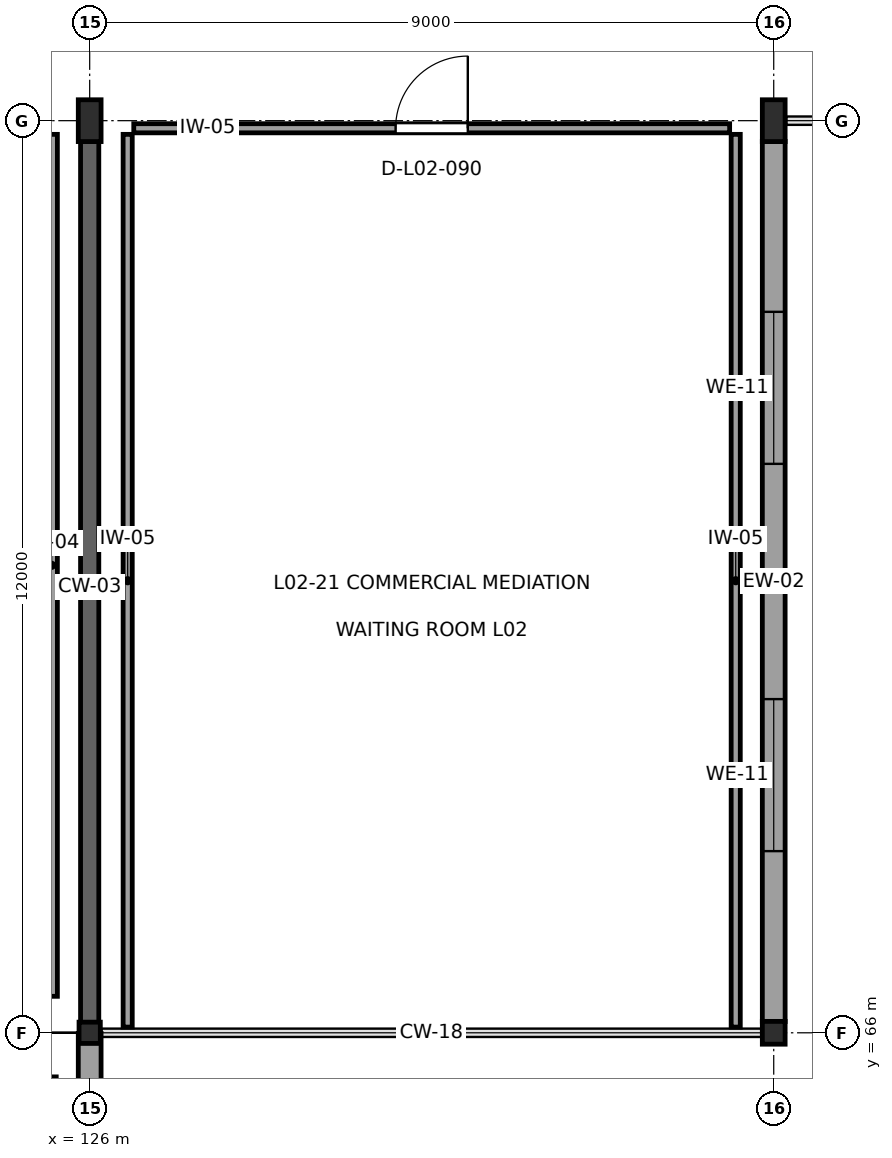
"""IFC4 building model, lengths in metres.
Left out: names, types, materials, properties, quantities, classifications, styles, units other than length and angle.
Written with IfcOpenShell. Run it as: python <this file> out.ifc"""

import sys

from ifc_helpers import new_model, si_unit, direction, frame, frame_2d, origin, origin_2d, place, context, subcontext, project, spatial, rectangle, i_section, extrude, element, fill, save


model = new_model("IFC4")
c1 = context("Model", 3, precision=1e-05, world=origin(), true_north=direction((0.0, 1.0)))
c2 = subcontext(c1, "Body", "Model", "MODEL_VIEW")
j1 = project(units=[si_unit("LENGTHUNIT", "METRE"), si_unit("PLANEANGLEUNIT", "RADIAN")], contexts=[c1])
p1 = place(None, origin())
s1 = spatial("IfcSite", under=j1, at=p1, CompositionType="ELEMENT")
p2 = place(p1, origin())
s2 = spatial("IfcBuilding", under=s1, at=p2, CompositionType="ELEMENT")
p3 = place(p2, frame((0.0, 0.0, 9.9)))
s3 = spatial("IfcBuildingStorey", under=s2, at=p3, CompositionType="ELEMENT", Elevation=9.9)
p4 = place(p3, frame((126.0, 66.0, 0.0), z_axis=(0.0, 0.0, 1.0), x_axis=(0.0, 1.0, 0.0)))
e1 = element("IfcColumn", 1, at=p4, inside=s3, PredefinedType="COLUMN", context=c2, shape_type="SweptSolid", body=[
    extrude(i_section(OverallWidth=0.28, OverallDepth=0.28, WebThickness=0.01, FlangeThickness=0.018, at=origin_2d()), origin(), (0.0, 0.0, 1.0), 4.5),
])
p5 = place(p3, frame((126.0, 78.0, 0.0), z_axis=(0.0, 0.0, 1.0), x_axis=(1.0, 0.0, 0.0)))
e2 = element("IfcColumn", 2, at=p5, inside=s3, PredefinedType="COLUMN", context=c2, shape_type="SweptSolid", body=[
    extrude(i_section(OverallWidth=0.3, OverallDepth=0.55, WebThickness=0.015, FlangeThickness=0.029, at=origin_2d()), origin(), (0.0, 0.0, 1.0), 4.5),
])
p6 = place(p3, frame((135.0, 66.0, 0.0), z_axis=(0.0, 0.0, 1.0), x_axis=(1.0, 0.0, 0.0)))
e3 = element("IfcColumn", 3, at=p6, inside=s3, PredefinedType="COLUMN", context=c2, shape_type="SweptSolid", body=[
    extrude(i_section(OverallWidth=0.3, OverallDepth=0.3, WebThickness=0.011, FlangeThickness=0.019, at=origin_2d()), origin(), (0.0, 0.0, 1.0), 4.5),
])
p7 = place(p3, frame((135.0, 78.0, 0.0), z_axis=(0.0, 0.0, 1.0), x_axis=(1.0, 0.0, 0.0)))
e4 = element("IfcColumn", 4, at=p7, inside=s3, PredefinedType="COLUMN", context=c2, shape_type="SweptSolid", body=[
    extrude(i_section(OverallWidth=0.3, OverallDepth=0.55, WebThickness=0.015, FlangeThickness=0.029, at=origin_2d()), origin(), (0.0, 0.0, 1.0), 4.5),
])
p8 = place(p3, frame((135.0, 66.148, 0.0), z_axis=(0.0, 0.0, 1.0), x_axis=(0.0, 1.0, 0.0)))
e5 = element("IfcWall", 5, at=p8, inside=s3, PredefinedType="SOLIDWALL", context=c2, shape_type="SweptSolid", body=[
    extrude(rectangle(XDim=11.579, YDim=0.3, at=frame_2d((5.79, 0.0))), origin(), (0.0, 0.0, 1.0), 3.845),
])
p9 = place(p8, frame((2.242, 0.0, 0.8)))
e6 = element("IfcOpeningElement", 6, at=p9, cuts=e5, PredefinedType="OPENING", context=c2, shape_type="SweptSolid", body=[
    extrude(rectangle(XDim=2.0, YDim=2.0, at=frame_2d((1.0, 1.0))), frame((0.0, 0.165, 0.0), z_axis=(0.0, -1.0, 0.0), x_axis=(1.0, 0.0, 0.0)), (0.0, 0.0, 1.0), 0.33),
])
p10 = place(p8, frame((7.337, 0.0, 0.8)))
e7 = element("IfcOpeningElement", 7, at=p10, cuts=e5, PredefinedType="OPENING", context=c2, shape_type="SweptSolid", body=[
    extrude(rectangle(XDim=2.0, YDim=2.0, at=frame_2d((1.0, 1.0))), frame((0.0, 0.165, 0.0), z_axis=(0.0, -1.0, 0.0), x_axis=(1.0, 0.0, 0.0)), (0.0, 0.0, 1.0), 0.33),
])
p11 = place(p3, frame((126.0, 54.138, 0.0), z_axis=(0.0, 0.0, 1.0), x_axis=(0.0, 1.0, 0.0)))
e8 = element("IfcWall", 8, at=p11, inside=s3, PredefinedType="SOLIDWALL", context=c2, shape_type="SweptSolid", body=[
    extrude(rectangle(XDim=11.854, YDim=0.3, at=frame_2d((5.927, 0.0))), origin(), (0.0, 0.0, 1.0), 3.695),
])
p12 = place(p3, frame((126.0, 66.008, 0.0), z_axis=(0.0, 0.0, 1.0), x_axis=(0.0, 1.0, 0.0)))
e9 = element("IfcWall", 9, at=p12, inside=s3, PredefinedType="SHEAR", context=c2, shape_type="SweptSolid", body=[
    extrude(rectangle(XDim=11.719, YDim=0.24, at=frame_2d((5.859, 0.0))), origin(), (0.0, 0.0, 1.0), 3.595),
])
p13 = place(p3, frame((125.5, 77.82, 0.0), z_axis=(0.0, 0.0, 1.0), x_axis=(0.0, -1.0, 0.0)))
e10 = element("IfcWall", 10, at=p13, inside=s3, PredefinedType="PARTITIONING", context=c2, shape_type="SweptSolid", body=[
    extrude(rectangle(XDim=11.34, YDim=0.15, at=frame_2d((5.67, 0.0))), origin(), (0.0, 0.0, 1.0), 4.14),
])
p14 = place(p3, frame((126.5, 66.075, 0.0), z_axis=(0.0, 0.0, 1.0), x_axis=(0.0, 1.0, 0.0)))
e11 = element("IfcWall", 11, at=p14, inside=s3, PredefinedType="PARTITIONING", context=c2, shape_type="SweptSolid", body=[
    extrude(rectangle(XDim=11.745, YDim=0.12, at=frame_2d((5.873, 0.0))), origin(), (0.0, 0.0, 1.0), 4.14),
])
p15 = place(p3, frame((126.58, 77.9, 0.0), z_axis=(0.0, 0.0, 1.0), x_axis=(1.0, 0.0, 0.0)))
e12 = element("IfcWall", 12, at=p15, inside=s3, PredefinedType="PARTITIONING", context=c2, shape_type="SweptSolid", body=[
    extrude(rectangle(XDim=7.84, YDim=0.12, at=frame_2d((3.92, 0.0))), origin(), (0.0, 0.0, 1.0), 3.705),
])
p16 = place(p15, frame((3.445, 0.0, 0.0)))
e13 = element("IfcOpeningElement", 13, at=p16, cuts=e12, PredefinedType="OPENING", context=c2, shape_type="SweptSolid", body=[
    extrude(rectangle(XDim=0.95, YDim=2.15, at=frame_2d((0.475, 1.075))), frame((0.0, 0.075, 0.0), z_axis=(0.0, -1.0, 0.0), x_axis=(1.0, 0.0, 0.0)), (0.0, 0.0, 1.0), 0.15),
])
p17 = place(p3, frame((134.5, 77.82, 0.0), z_axis=(0.0, 0.0, 1.0), x_axis=(0.0, -1.0, 0.0)))
e14 = element("IfcWall", 14, at=p17, inside=s3, PredefinedType="PARTITIONING", context=c2, shape_type="SweptSolid", body=[
    extrude(rectangle(XDim=11.745, YDim=0.12, at=frame_2d((5.873, 0.0))), origin(), (0.0, 0.0, 1.0), 4.14),
])
p18 = place(p3, frame((125.5, 65.42, 0.0), z_axis=(0.0, 0.0, 1.0), x_axis=(0.0, -1.0, 0.0)))
e15 = element("IfcWall", 15, at=p18, inside=s3, PredefinedType="PARTITIONING", context=c2, shape_type="SweptSolid", body=[
    extrude(rectangle(XDim=10.84, YDim=0.12, at=frame_2d((5.42, 0.0))), origin(), (0.0, 0.0, 1.0), 4.14),
])
p19 = place(p9, origin())
e16 = element("IfcWindow", 16, at=p19, inside=s3, PartitioningType="SINGLE_PANEL", PredefinedType="WINDOW", context=c2, shape_type="SweptSolid", body=[
    extrude(rectangle(XDim=2.0, YDim=2.0, at=frame_2d((1.0, 1.0))), frame((0.0, 0.03, 0.0), z_axis=(0.0, -1.0, 0.0), x_axis=(1.0, 0.0, 0.0)), (0.0, 0.0, 1.0), 0.06),
])
fill(e6, e16)
p20 = place(p10, origin())
e17 = element("IfcWindow", 17, at=p20, inside=s3, PartitioningType="SINGLE_PANEL", PredefinedType="WINDOW", context=c2, shape_type="SweptSolid", body=[
    extrude(rectangle(XDim=2.0, YDim=2.0, at=frame_2d((1.0, 1.0))), frame((0.0, 0.03, 0.0), z_axis=(0.0, -1.0, 0.0), x_axis=(1.0, 0.0, 0.0)), (0.0, 0.0, 1.0), 0.06),
])
fill(e7, e17)
p21 = place(p16, origin())
e18 = element("IfcDoor", 18, at=p21, inside=s3, OperationType="SINGLE_SWING_RIGHT", PredefinedType="DOOR", context=c2, shape_type="SweptSolid", body=[
    extrude(rectangle(XDim=0.95, YDim=2.15, at=frame_2d((0.475, 1.075))), frame((0.0, 0.025, 0.0), z_axis=(0.0, -1.0, 0.0), x_axis=(1.0, 0.0, 0.0)), (0.0, 0.0, 1.0), 0.05),
])
fill(e13, e18)
save(model, sys.argv[1])
